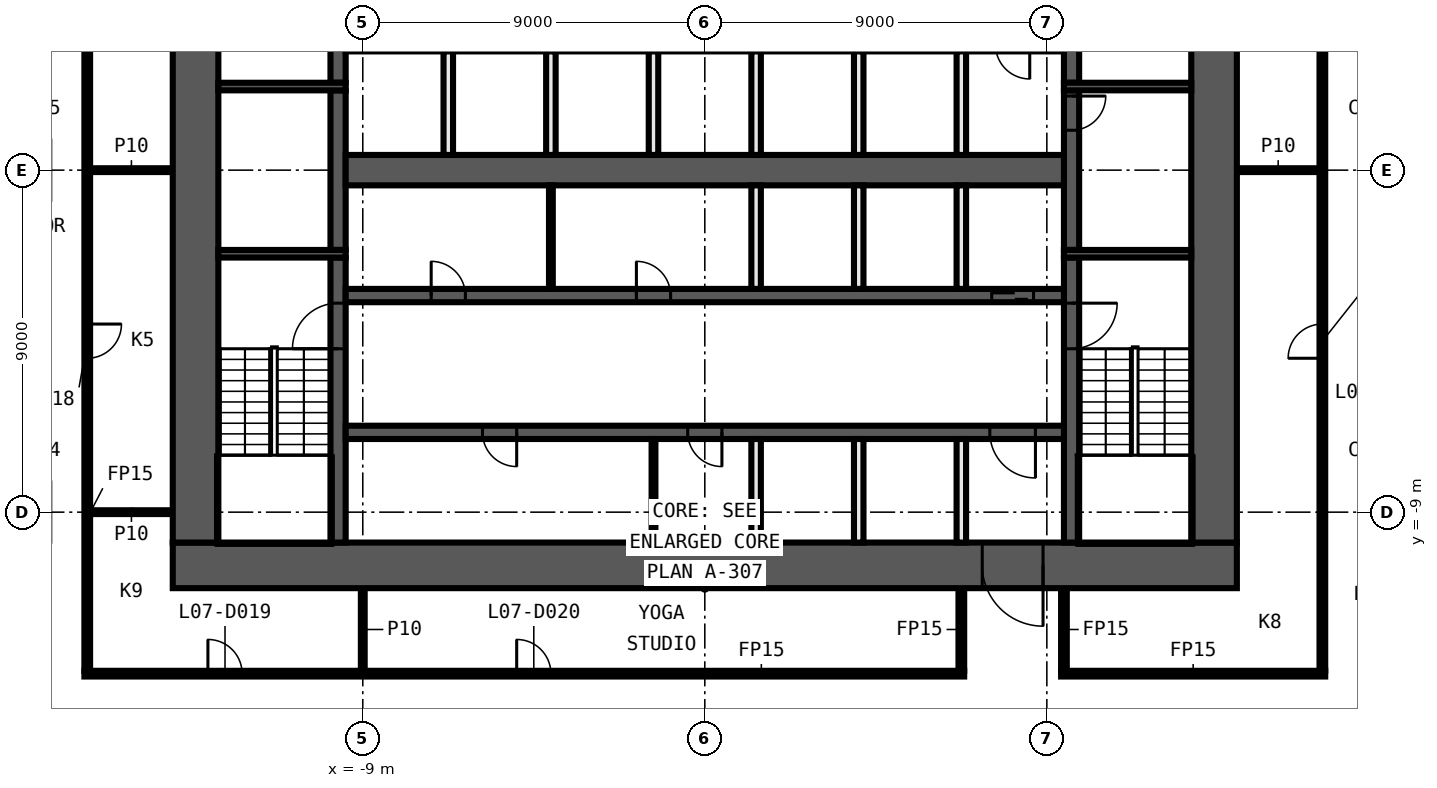
"""IFC4 building model, lengths in metres.
Left out: names, types, materials, properties, quantities, classifications, styles, units other than length and angle.
Written with IfcOpenShell. Run it as: python <this file> out.ifc"""

import sys

from ifc_helpers import new_model, si_unit, direction, frame, frame_2d, origin, place, context, subcontext, project, spatial, rectangle, extrude, element, fill, save


model = new_model("IFC4")
c1 = context("Model", 3, precision=1e-05, world=origin(), true_north=direction((0.0, 1.0)))
c2 = subcontext(c1, "Body", "Model", "MODEL_VIEW")
j1 = project(units=[si_unit("LENGTHUNIT", "METRE"), si_unit("PLANEANGLEUNIT", "RADIAN")], contexts=[c1])
p1 = place(None, origin())
s1 = spatial("IfcSite", under=j1, at=p1, CompositionType="ELEMENT")
p2 = place(p1, origin())
s2 = spatial("IfcBuilding", under=s1, at=p2, CompositionType="ELEMENT")
p3 = place(p2, frame((0.0, 0.0, 47.7)))
s3 = spatial("IfcBuildingStorey", under=s2, at=p3, CompositionType="ELEMENT", Elevation=47.7)
p4 = place(p3, frame((-16.325, -13.25, 0.0), z_axis=(0.0, 0.0, 1.0), x_axis=(1.0, 0.0, 0.0)))
e1 = element("IfcWall", 1, at=p4, inside=s3, PredefinedType="PARTITIONING", context=c2, shape_type="SweptSolid", body=[
    extrude(rectangle(XDim=23.15, YDim=0.15, at=frame_2d((11.575, 0.0))), origin(), (0.0, 0.0, 1.0), 3.3),
])
p5 = place(p4, frame((3.25, 0.0, 0.0)))
e2 = element("IfcOpeningElement", 2, at=p5, cuts=e1, PredefinedType="OPENING", context=c2, shape_type="SweptSolid", body=[
    extrude(rectangle(XDim=0.9, YDim=2.1, at=frame_2d((0.45, 1.05))), frame((0.0, 0.085, 0.0), z_axis=(0.0, -1.0, 0.0), x_axis=(1.0, 0.0, 0.0)), (0.0, 0.0, 1.0), 0.17),
])
p6 = place(p4, frame((11.375, 0.0, 0.0)))
e3 = element("IfcOpeningElement", 3, at=p6, cuts=e1, PredefinedType="OPENING", context=c2, shape_type="SweptSolid", body=[
    extrude(rectangle(XDim=0.9, YDim=2.1, at=frame_2d((0.45, 1.05))), frame((0.0, 0.085, 0.0), z_axis=(0.0, -1.0, 0.0), x_axis=(1.0, 0.0, 0.0)), (0.0, 0.0, 1.0), 0.17),
])
p7 = place(p3, frame((9.375, -13.25, 0.0), z_axis=(0.0, 0.0, 1.0), x_axis=(1.0, 0.0, 0.0)))
e4 = element("IfcWall", 4, at=p7, inside=s3, PredefinedType="PARTITIONING", context=c2, shape_type="SweptSolid", body=[
    extrude(rectangle(XDim=6.95, YDim=0.15, at=frame_2d((3.475, 0.0))), origin(), (0.0, 0.0, 1.0), 3.3),
])
for number, where, z_axis, x_axis in (
    (5, (-16.175, -9.0, 0.0), (0.0, 0.0, 1.0), (1.0, 0.0, 0.0)),
    (6, (-16.175, 0.0, 0.0), (0.0, 0.0, 1.0), (1.0, 0.0, 0.0)),
    (7, (14.0, 0.0, 0.0), (0.0, 0.0, 1.0), (1.0, 0.0, 0.0)),
):
    element("IfcWall", number, at=place(p3, frame(where, z_axis=z_axis, x_axis=x_axis)), inside=s3, PredefinedType="PARTITIONING", context=c2, shape_type="SweptSolid", body=[
        extrude(rectangle(XDim=2.175, YDim=0.1, at=frame_2d((1.087, 0.0))), origin(), (0.0, 0.0, 1.0), 3.3),
    ])
p8 = place(p3, frame((16.25, -13.175, 0.0), z_axis=(0.0, 0.0, 1.0), x_axis=(0.0, 1.0, 0.0)))
e8 = element("IfcWall", 8, at=p8, inside=s3, PredefinedType="PARTITIONING", context=c2, shape_type="SweptSolid", body=[
    extrude(rectangle(XDim=26.35, YDim=0.15, at=frame_2d((13.175, 0.0))), origin(), (0.0, 0.0, 1.0), 3.3),
])
p9 = place(p8, frame((8.225, 0.0, 0.0)))
e9 = element("IfcOpeningElement", 9, at=p9, cuts=e8, PredefinedType="OPENING", context=c2, shape_type="SweptSolid", body=[
    extrude(rectangle(XDim=0.9, YDim=2.1, at=frame_2d((0.45, 1.05))), frame((0.0, 0.085, 0.0), z_axis=(0.0, -1.0, 0.0), x_axis=(1.0, 0.0, 0.0)), (0.0, 0.0, 1.0), 0.17),
])
p10 = place(p8, frame((17.225, 0.0, 0.0)))
e10 = element("IfcOpeningElement", 10, at=p10, cuts=e8, PredefinedType="OPENING", context=c2, shape_type="SweptSolid", body=[
    extrude(rectangle(XDim=0.9, YDim=2.1, at=frame_2d((0.45, 1.05))), frame((0.0, 0.085, 0.0), z_axis=(0.0, -1.0, 0.0), x_axis=(1.0, 0.0, 0.0)), (0.0, 0.0, 1.0), 0.17),
])
for number, where, z_axis, x_axis in (
    (11, (9.45, -13.175, 0.0), (0.0, 0.0, 1.0), (0.0, 1.0, 0.0)),
    (12, (6.75, -13.175, 0.0), (0.0, 0.0, 1.0), (0.0, 1.0, 0.0)),
):
    element("IfcWall", number, at=place(p3, frame(where, z_axis=z_axis, x_axis=x_axis)), inside=s3, PredefinedType="PARTITIONING", context=c2, shape_type="SweptSolid", body=[
        extrude(rectangle(XDim=2.175, YDim=0.15, at=frame_2d((1.087, 0.0))), origin(), (0.0, 0.0, 1.0), 3.3),
    ])
p11 = place(p3, frame((-9.0, -13.175, 0.0), z_axis=(0.0, 0.0, 1.0), x_axis=(0.0, 1.0, 0.0)))
e13 = element("IfcWall", 13, at=p11, inside=s3, PredefinedType="PARTITIONING", context=c2, shape_type="SweptSolid", body=[
    extrude(rectangle(XDim=2.175, YDim=0.1, at=frame_2d((1.087, 0.0))), origin(), (0.0, 0.0, 1.0), 3.3),
])
p12 = place(p3, frame((-16.25, 13.175, 0.0), z_axis=(0.0, 0.0, 1.0), x_axis=(0.0, -1.0, 0.0)))
e14 = element("IfcWall", 14, at=p12, inside=s3, PredefinedType="PARTITIONING", context=c2, shape_type="SweptSolid", body=[
    extrude(rectangle(XDim=26.35, YDim=0.15, at=frame_2d((13.175, 0.0))), origin(), (0.0, 0.0, 1.0), 3.3),
])
p13 = place(p12, frame((17.225, 0.0, 0.0)))
e15 = element("IfcOpeningElement", 15, at=p13, cuts=e14, PredefinedType="OPENING", context=c2, shape_type="SweptSolid", body=[
    extrude(rectangle(XDim=0.9, YDim=2.1, at=frame_2d((0.45, 1.05))), frame((0.0, 0.085, 0.0), z_axis=(0.0, -1.0, 0.0), x_axis=(1.0, 0.0, 0.0)), (0.0, 0.0, 1.0), 0.17),
])
p14 = place(p12, frame((8.225, 0.0, 0.0)))
e16 = element("IfcOpeningElement", 16, at=p14, cuts=e14, PredefinedType="OPENING", context=c2, shape_type="SweptSolid", body=[
    extrude(rectangle(XDim=0.9, YDim=2.1, at=frame_2d((0.45, 1.05))), frame((0.0, 0.085, 0.0), z_axis=(0.0, -1.0, 0.0), x_axis=(1.0, 0.0, 0.0)), (0.0, 0.0, 1.0), 0.17),
])
p15 = place(p3, frame((14.0, -10.4, 0.0), z_axis=(0.0, 0.0, 1.0), x_axis=(-1.0, 0.0, 0.0)))
e17 = element("IfcWall", 17, at=p15, inside=s3, PredefinedType="SHEAR", context=c2, shape_type="SweptSolid", body=[
    extrude(rectangle(XDim=28.0, YDim=1.2, at=frame_2d((14.0, 0.0))), origin(), (0.0, 0.0, 1.0), 3.3),
])
p16 = place(p15, frame((5.1, 0.0, 0.0)))
e18 = element("IfcOpeningElement", 18, at=p16, cuts=e17, PredefinedType="OPENING", context=c2, shape_type="SweptSolid", body=[
    extrude(rectangle(XDim=1.6, YDim=2.1, at=frame_2d((0.8, 1.05))), frame((0.0, 0.61, 0.0), z_axis=(0.0, -1.0, 0.0), x_axis=(1.0, 0.0, 0.0)), (0.0, 0.0, 1.0), 1.22),
])
for number, where, z_axis, x_axis in (
    (19, (13.4, 9.8, 0.0), (0.0, 0.0, 1.0), (0.0, -1.0, 0.0)),
    (20, (-13.4, -9.8, 0.0), (0.0, 0.0, 1.0), (0.0, 1.0, 0.0)),
):
    element("IfcWall", number, at=place(p3, frame(where, z_axis=z_axis, x_axis=x_axis)), inside=s3, PredefinedType="SHEAR", context=c2, shape_type="SweptSolid", body=[
        extrude(rectangle(XDim=19.6, YDim=1.2, at=frame_2d((9.8, 0.0))), origin(), (0.0, 0.0, 1.0), 3.3),
    ])
p17 = place(p3, frame((9.65, -2.3, 0.0), z_axis=(0.0, 0.0, 1.0), x_axis=(0.0, -1.0, 0.0)))
e21 = element("IfcWall", 21, at=p17, inside=s3, PredefinedType="SHEAR", context=c2, shape_type="SweptSolid", body=[
    extrude(rectangle(XDim=7.5, YDim=0.4, at=frame_2d((3.75, 0.0))), origin(), (0.0, 0.0, 1.0), 3.3),
])
p18 = place(p17, frame((1.2, 0.0, 0.0)))
e22 = element("IfcOpeningElement", 22, at=p18, cuts=e21, PredefinedType="OPENING", context=c2, shape_type="SweptSolid", body=[
    extrude(rectangle(XDim=1.2, YDim=2.1, at=frame_2d((0.6, 1.05))), frame((0.0, 0.21, 0.0), z_axis=(0.0, -1.0, 0.0), x_axis=(1.0, 0.0, 0.0)), (0.0, 0.0, 1.0), 0.42),
])
p19 = place(p3, frame((9.65, 2.1, 0.0), z_axis=(0.0, 0.0, 1.0), x_axis=(0.0, -1.0, 0.0)))
e23 = element("IfcWall", 23, at=p19, inside=s3, PredefinedType="SHEAR", context=c2, shape_type="SweptSolid", body=[
    extrude(rectangle(XDim=4.2, YDim=0.4, at=frame_2d((2.1, 0.0))), origin(), (0.0, 0.0, 1.0), 3.3),
])
p20 = place(p19, frame((0.15, 0.0, 0.0)))
e24 = element("IfcOpeningElement", 24, at=p20, cuts=e23, PredefinedType="OPENING", context=c2, shape_type="SweptSolid", body=[
    extrude(rectangle(XDim=0.9, YDim=2.1, at=frame_2d((0.45, 1.05))), frame((0.0, 0.21, 0.0), z_axis=(0.0, -1.0, 0.0), x_axis=(1.0, 0.0, 0.0)), (0.0, 0.0, 1.0), 0.42),
])
p21 = place(p3, frame((9.65, 9.8, 0.0), z_axis=(0.0, 0.0, 1.0), x_axis=(0.0, -1.0, 0.0)))
e25 = element("IfcWall", 25, at=p21, inside=s3, PredefinedType="SHEAR", context=c2, shape_type="SweptSolid", body=[
    extrude(rectangle(XDim=7.5, YDim=0.4, at=frame_2d((3.75, 0.0))), origin(), (0.0, 0.0, 1.0), 3.3),
])
p22 = place(p21, frame((5.1, 0.0, 0.0)))
e26 = element("IfcOpeningElement", 26, at=p22, cuts=e25, PredefinedType="OPENING", context=c2, shape_type="SweptSolid", body=[
    extrude(rectangle(XDim=1.2, YDim=2.1, at=frame_2d((0.6, 1.05))), frame((0.0, 0.21, 0.0), z_axis=(0.0, -1.0, 0.0), x_axis=(1.0, 0.0, 0.0)), (0.0, 0.0, 1.0), 0.42),
])
p23 = place(p3, frame((-9.65, -9.8, 0.0), z_axis=(0.0, 0.0, 1.0), x_axis=(0.0, 1.0, 0.0)))
e27 = element("IfcWall", 27, at=p23, inside=s3, PredefinedType="SHEAR", context=c2, shape_type="SweptSolid", body=[
    extrude(rectangle(XDim=7.5, YDim=0.4, at=frame_2d((3.75, 0.0))), origin(), (0.0, 0.0, 1.0), 3.3),
])
p24 = place(p23, frame((5.1, 0.0, 0.0)))
e28 = element("IfcOpeningElement", 28, at=p24, cuts=e27, PredefinedType="OPENING", context=c2, shape_type="SweptSolid", body=[
    extrude(rectangle(XDim=1.2, YDim=2.1, at=frame_2d((0.6, 1.05))), frame((0.0, 0.21, 0.0), z_axis=(0.0, -1.0, 0.0), x_axis=(1.0, 0.0, 0.0)), (0.0, 0.0, 1.0), 0.42),
])
p25 = place(p3, frame((-9.65, -2.1, 0.0), z_axis=(0.0, 0.0, 1.0), x_axis=(0.0, 1.0, 0.0)))
e29 = element("IfcWall", 29, at=p25, inside=s3, PredefinedType="SHEAR", context=c2, shape_type="SweptSolid", body=[
    extrude(rectangle(XDim=4.2, YDim=0.4, at=frame_2d((2.1, 0.0))), origin(), (0.0, 0.0, 1.0), 3.3),
])
p26 = place(p3, frame((-9.65, 2.3, 0.0), z_axis=(0.0, 0.0, 1.0), x_axis=(0.0, 1.0, 0.0)))
e30 = element("IfcWall", 30, at=p26, inside=s3, PredefinedType="SHEAR", context=c2, shape_type="SweptSolid", body=[
    extrude(rectangle(XDim=7.5, YDim=0.4, at=frame_2d((3.75, 0.0))), origin(), (0.0, 0.0, 1.0), 3.3),
])
p27 = place(p26, frame((1.2, 0.0, 0.0)))
e31 = element("IfcOpeningElement", 31, at=p27, cuts=e30, PredefinedType="OPENING", context=c2, shape_type="SweptSolid", body=[
    extrude(rectangle(XDim=1.2, YDim=2.1, at=frame_2d((0.6, 1.05))), frame((0.0, 0.21, 0.0), z_axis=(0.0, -1.0, 0.0), x_axis=(1.0, 0.0, 0.0)), (0.0, 0.0, 1.0), 0.42),
])
for number, where, z_axis, x_axis in (
    (32, (9.45, 2.2, 0.0), (0.0, 0.0, 1.0), (1.0, 0.0, 0.0)),
    (33, (-9.45, 2.2, 0.0), (0.0, 0.0, 1.0), (-1.0, 0.0, 0.0)),
    (34, (9.45, -2.2, 0.0), (0.0, 0.0, 1.0), (1.0, 0.0, 0.0)),
    (35, (-9.45, -2.2, 0.0), (0.0, 0.0, 1.0), (-1.0, 0.0, 0.0)),
):
    element("IfcWall", number, at=place(p3, frame(where, z_axis=z_axis, x_axis=x_axis)), inside=s3, PredefinedType="SHEAR", context=c2, shape_type="SweptSolid", body=[
        extrude(rectangle(XDim=3.35, YDim=0.2, at=frame_2d((1.675, 0.0))), origin(), (0.0, 0.0, 1.0), 3.3),
    ])
p28 = place(p3, frame((-9.45, -3.3, 0.0), z_axis=(0.0, 0.0, 1.0), x_axis=(1.0, 0.0, 0.0)))
e36 = element("IfcWall", 36, at=p28, inside=s3, PredefinedType="SHEAR", context=c2, shape_type="SweptSolid", body=[
    extrude(rectangle(XDim=18.9, YDim=0.35, at=frame_2d((9.45, 0.0))), origin(), (0.0, 0.0, 1.0), 3.3),
])
p29 = place(p28, frame((17.0, 0.0, 0.0)))
e37 = element("IfcOpeningElement", 37, at=p29, cuts=e36, PredefinedType="OPENING", context=c2, shape_type="SweptSolid", body=[
    extrude(rectangle(XDim=1.1, YDim=2.1, at=frame_2d((0.55, 1.05))), frame((0.0, 0.185, 0.0), z_axis=(0.0, -1.0, 0.0), x_axis=(1.0, 0.0, 0.0)), (0.0, 0.0, 1.0), 0.37),
])
p30 = place(p28, frame((2.25, 0.0, 0.0)))
e38 = element("IfcOpeningElement", 38, at=p30, cuts=e36, PredefinedType="OPENING", context=c2, shape_type="SweptSolid", body=[
    extrude(rectangle(XDim=0.9, YDim=2.1, at=frame_2d((0.45, 1.05))), frame((0.0, 0.185, 0.0), z_axis=(0.0, -1.0, 0.0), x_axis=(1.0, 0.0, 0.0)), (0.0, 0.0, 1.0), 0.37),
])
p31 = place(p28, frame((7.65, 0.0, 0.0)))
e39 = element("IfcOpeningElement", 39, at=p31, cuts=e36, PredefinedType="OPENING", context=c2, shape_type="SweptSolid", body=[
    extrude(rectangle(XDim=0.9, YDim=2.1, at=frame_2d((0.45, 1.05))), frame((0.0, 0.185, 0.0), z_axis=(0.0, -1.0, 0.0), x_axis=(1.0, 0.0, 0.0)), (0.0, 0.0, 1.0), 0.37),
])
p32 = place(p3, frame((9.45, -6.9, 0.0), z_axis=(0.0, 0.0, 1.0), x_axis=(-1.0, 0.0, 0.0)))
e40 = element("IfcWall", 40, at=p32, inside=s3, PredefinedType="SHEAR", context=c2, shape_type="SweptSolid", body=[
    extrude(rectangle(XDim=18.9, YDim=0.35, at=frame_2d((9.45, 0.0))), origin(), (0.0, 0.0, 1.0), 3.3),
])
p33 = place(p32, frame((0.75, 0.0, 0.0)))
e41 = element("IfcOpeningElement", 41, at=p33, cuts=e40, PredefinedType="OPENING", context=c2, shape_type="SweptSolid", body=[
    extrude(rectangle(XDim=1.2, YDim=2.1, at=frame_2d((0.6, 1.05))), frame((0.0, 0.185, 0.0), z_axis=(0.0, -1.0, 0.0), x_axis=(1.0, 0.0, 0.0)), (0.0, 0.0, 1.0), 0.37),
])
p34 = place(p32, frame((14.4, 0.0, 0.0)))
e42 = element("IfcOpeningElement", 42, at=p34, cuts=e40, PredefinedType="OPENING", context=c2, shape_type="SweptSolid", body=[
    extrude(rectangle(XDim=0.9, YDim=2.1, at=frame_2d((0.45, 1.05))), frame((0.0, 0.185, 0.0), z_axis=(0.0, -1.0, 0.0), x_axis=(1.0, 0.0, 0.0)), (0.0, 0.0, 1.0), 0.37),
])
p35 = place(p32, frame((9.0, 0.0, 0.0)))
e43 = element("IfcOpeningElement", 43, at=p35, cuts=e40, PredefinedType="OPENING", context=c2, shape_type="SweptSolid", body=[
    extrude(rectangle(XDim=0.9, YDim=2.1, at=frame_2d((0.45, 1.05))), frame((0.0, 0.185, 0.0), z_axis=(0.0, -1.0, 0.0), x_axis=(1.0, 0.0, 0.0)), (0.0, 0.0, 1.0), 0.37),
])
p36 = place(p3, frame((-9.45, 0.0, 0.0), z_axis=(0.0, 0.0, 1.0), x_axis=(1.0, 0.0, 0.0)))
e44 = element("IfcWall", 44, at=p36, inside=s3, PredefinedType="SHEAR", context=c2, shape_type="SweptSolid", body=[
    extrude(rectangle(XDim=18.9, YDim=0.8, at=frame_2d((9.45, 0.0))), origin(), (0.0, 0.0, 1.0), 3.3),
])
for number, where, z_axis, x_axis in (
    (45, (6.75, -9.8, 0.0), (0.0, 0.0, 1.0), (0.0, 1.0, 0.0)),
    (46, (6.75, -3.125, 0.0), (0.0, 0.0, 1.0), (0.0, 1.0, 0.0)),
    (47, (6.75, 0.4, 0.0), (0.0, 0.0, 1.0), (0.0, 1.0, 0.0)),
    (48, (4.05, -9.8, 0.0), (0.0, 0.0, 1.0), (0.0, 1.0, 0.0)),
    (49, (4.05, -3.125, 0.0), (0.0, 0.0, 1.0), (0.0, 1.0, 0.0)),
    (50, (4.05, 0.4, 0.0), (0.0, 0.0, 1.0), (0.0, 1.0, 0.0)),
    (51, (1.35, -9.8, 0.0), (0.0, 0.0, 1.0), (0.0, 1.0, 0.0)),
    (52, (1.35, -3.125, 0.0), (0.0, 0.0, 1.0), (0.0, 1.0, 0.0)),
    (53, (1.35, 0.4, 0.0), (0.0, 0.0, 1.0), (0.0, 1.0, 0.0)),
):
    element("IfcWall", number, at=place(p3, frame(where, z_axis=z_axis, x_axis=x_axis)), inside=s3, PredefinedType="SOLIDWALL", context=c2, shape_type="SweptSolid", body=[
        extrude(rectangle(XDim=2.725, YDim=0.25, at=frame_2d((1.363, 0.0))), origin(), (0.0, 0.0, 1.0), 3.3),
    ])
p37 = place(p3, frame((-1.35, -9.8, 0.0), z_axis=(0.0, 0.0, 1.0), x_axis=(0.0, 1.0, 0.0)))
e54 = element("IfcWall", 54, at=p37, inside=s3, PredefinedType="PARTITIONING", context=c2, shape_type="SweptSolid", body=[
    extrude(rectangle(XDim=2.725, YDim=0.1, at=frame_2d((1.363, 0.0))), origin(), (0.0, 0.0, 1.0), 3.3),
])
p38 = place(p3, frame((-1.35, 0.4, 0.0), z_axis=(0.0, 0.0, 1.0), x_axis=(0.0, 1.0, 0.0)))
e55 = element("IfcWall", 55, at=p38, inside=s3, PredefinedType="SOLIDWALL", context=c2, shape_type="SweptSolid", body=[
    extrude(rectangle(XDim=2.725, YDim=0.25, at=frame_2d((1.363, 0.0))), origin(), (0.0, 0.0, 1.0), 3.3),
])
p39 = place(p3, frame((-4.05, -3.125, 0.0), z_axis=(0.0, 0.0, 1.0), x_axis=(0.0, 1.0, 0.0)))
e56 = element("IfcWall", 56, at=p39, inside=s3, PredefinedType="PARTITIONING", context=c2, shape_type="SweptSolid", body=[
    extrude(rectangle(XDim=2.725, YDim=0.1, at=frame_2d((1.363, 0.0))), origin(), (0.0, 0.0, 1.0), 3.3),
])
for number, where, z_axis, x_axis in (
    (57, (-4.05, 0.4, 0.0), (0.0, 0.0, 1.0), (0.0, 1.0, 0.0)),
    (58, (-6.75, 0.4, 0.0), (0.0, 0.0, 1.0), (0.0, 1.0, 0.0)),
):
    element("IfcWall", number, at=place(p3, frame(where, z_axis=z_axis, x_axis=x_axis)), inside=s3, PredefinedType="SOLIDWALL", context=c2, shape_type="SweptSolid", body=[
        extrude(rectangle(XDim=2.725, YDim=0.25, at=frame_2d((1.363, 0.0))), origin(), (0.0, 0.0, 1.0), 3.3),
    ])
p40 = place(p13, origin())
e59 = element("IfcDoor", 59, at=p40, inside=s3, OperationType="SINGLE_SWING_RIGHT", PredefinedType="DOOR", context=c2, shape_type="SweptSolid", body=[
    extrude(rectangle(XDim=0.9, YDim=2.1, at=frame_2d((0.45, 1.05))), frame((0.0, 0.025, 0.0), z_axis=(0.0, -1.0, 0.0), x_axis=(1.0, 0.0, 0.0)), (0.0, 0.0, 1.0), 0.05),
])
fill(e15, e59)
p41 = place(p5, origin())
e60 = element("IfcDoor", 60, at=p41, inside=s3, OperationType="SINGLE_SWING_LEFT", PredefinedType="DOOR", context=c2, shape_type="SweptSolid", body=[
    extrude(rectangle(XDim=0.9, YDim=2.1, at=frame_2d((0.45, 1.05))), frame((0.0, 0.025, 0.0), z_axis=(0.0, -1.0, 0.0), x_axis=(1.0, 0.0, 0.0)), (0.0, 0.0, 1.0), 0.05),
])
fill(e2, e60)
p42 = place(p6, origin())
e61 = element("IfcDoor", 61, at=p42, inside=s3, OperationType="SINGLE_SWING_RIGHT", PredefinedType="DOOR", context=c2, shape_type="SweptSolid", body=[
    extrude(rectangle(XDim=0.9, YDim=2.1, at=frame_2d((0.45, 1.05))), frame((0.0, 0.025, 0.0), z_axis=(0.0, -1.0, 0.0), x_axis=(1.0, 0.0, 0.0)), (0.0, 0.0, 1.0), 0.05),
])
fill(e3, e61)
p43 = place(p9, origin())
e62 = element("IfcDoor", 62, at=p43, inside=s3, OperationType="SINGLE_SWING_LEFT", PredefinedType="DOOR", context=c2, shape_type="SweptSolid", body=[
    extrude(rectangle(XDim=0.9, YDim=2.1, at=frame_2d((0.45, 1.05))), frame((0.0, 0.025, 0.0), z_axis=(0.0, -1.0, 0.0), x_axis=(1.0, 0.0, 0.0)), (0.0, 0.0, 1.0), 0.05),
])
fill(e9, e62)
p44 = place(p20, origin())
e63 = element("IfcDoor", 63, at=p44, inside=s3, OperationType="SINGLE_SWING_RIGHT", PredefinedType="DOOR", context=c2, shape_type="SweptSolid", body=[
    extrude(rectangle(XDim=0.9, YDim=2.1, at=frame_2d((0.45, 1.05))), frame((0.0, 0.025, 0.0), z_axis=(0.0, -1.0, 0.0), x_axis=(1.0, 0.0, 0.0)), (0.0, 0.0, 1.0), 0.05),
])
fill(e24, e63)
p45 = place(p29, origin())
e64 = element("IfcDoor", 64, at=p45, inside=s3, OperationType="DOUBLE_DOOR_SLIDING", PredefinedType="DOOR", context=c2, shape_type="SweptSolid", body=[
    extrude(rectangle(XDim=1.1, YDim=2.1, at=frame_2d((0.55, 1.05))), frame((0.0, 0.025, 0.0), z_axis=(0.0, -1.0, 0.0), x_axis=(1.0, 0.0, 0.0)), (0.0, 0.0, 1.0), 0.05),
])
fill(e37, e64)
p46 = place(p16, origin())
e65 = element("IfcDoor", 65, at=p46, inside=s3, OperationType="DOUBLE_DOOR_SINGLE_SWING", PredefinedType="DOOR", context=c2, shape_type="SweptSolid", body=[
    extrude(rectangle(XDim=1.6, YDim=2.1, at=frame_2d((0.8, 1.05))), frame((0.0, 0.025, 0.0), z_axis=(0.0, -1.0, 0.0), x_axis=(1.0, 0.0, 0.0)), (0.0, 0.0, 1.0), 0.05),
])
fill(e18, e65)
p47 = place(p33, origin())
e66 = element("IfcDoor", 66, at=p47, inside=s3, OperationType="SINGLE_SWING_LEFT", PredefinedType="DOOR", context=c2, shape_type="SweptSolid", body=[
    extrude(rectangle(XDim=1.2, YDim=2.1, at=frame_2d((0.6, 1.05))), frame((0.0, 0.025, 0.0), z_axis=(0.0, -1.0, 0.0), x_axis=(1.0, 0.0, 0.0)), (0.0, 0.0, 1.0), 0.05),
])
fill(e41, e66)
p48 = place(p30, origin())
e67 = element("IfcDoor", 67, at=p48, inside=s3, OperationType="SINGLE_SWING_RIGHT", PredefinedType="DOOR", context=c2, shape_type="SweptSolid", body=[
    extrude(rectangle(XDim=0.9, YDim=2.1, at=frame_2d((0.45, 1.05))), frame((0.0, 0.025, 0.0), z_axis=(0.0, -1.0, 0.0), x_axis=(1.0, 0.0, 0.0)), (0.0, 0.0, 1.0), 0.05),
])
fill(e38, e67)
p49 = place(p31, origin())
e68 = element("IfcDoor", 68, at=p49, inside=s3, OperationType="SINGLE_SWING_LEFT", PredefinedType="DOOR", context=c2, shape_type="SweptSolid", body=[
    extrude(rectangle(XDim=0.9, YDim=2.1, at=frame_2d((0.45, 1.05))), frame((0.0, 0.025, 0.0), z_axis=(0.0, -1.0, 0.0), x_axis=(1.0, 0.0, 0.0)), (0.0, 0.0, 1.0), 0.05),
])
fill(e39, e68)
p50 = place(p34, origin())
e69 = element("IfcDoor", 69, at=p50, inside=s3, OperationType="SINGLE_SWING_RIGHT", PredefinedType="DOOR", context=c2, shape_type="SweptSolid", body=[
    extrude(rectangle(XDim=0.9, YDim=2.1, at=frame_2d((0.45, 1.05))), frame((0.0, 0.025, 0.0), z_axis=(0.0, -1.0, 0.0), x_axis=(1.0, 0.0, 0.0)), (0.0, 0.0, 1.0), 0.05),
])
fill(e42, e69)
p51 = place(p35, origin())
e70 = element("IfcDoor", 70, at=p51, inside=s3, OperationType="SINGLE_SWING_LEFT", PredefinedType="DOOR", context=c2, shape_type="SweptSolid", body=[
    extrude(rectangle(XDim=0.9, YDim=2.1, at=frame_2d((0.45, 1.05))), frame((0.0, 0.025, 0.0), z_axis=(0.0, -1.0, 0.0), x_axis=(1.0, 0.0, 0.0)), (0.0, 0.0, 1.0), 0.05),
])
fill(e43, e70)
p52 = place(p18, origin())
e71 = element("IfcDoor", 71, at=p52, inside=s3, OperationType="SINGLE_SWING_RIGHT", PredefinedType="DOOR", context=c2, shape_type="SweptSolid", body=[
    extrude(rectangle(XDim=1.2, YDim=2.1, at=frame_2d((0.6, 1.05))), frame((0.0, 0.025, 0.0), z_axis=(0.0, -1.0, 0.0), x_axis=(1.0, 0.0, 0.0)), (0.0, 0.0, 1.0), 0.05),
])
fill(e22, e71)
p53 = place(p24, origin())
e72 = element("IfcDoor", 72, at=p53, inside=s3, OperationType="SINGLE_SWING_LEFT", PredefinedType="DOOR", context=c2, shape_type="SweptSolid", body=[
    extrude(rectangle(XDim=1.2, YDim=2.1, at=frame_2d((0.6, 1.05))), frame((0.0, 0.025, 0.0), z_axis=(0.0, -1.0, 0.0), x_axis=(1.0, 0.0, 0.0)), (0.0, 0.0, 1.0), 0.05),
])
fill(e28, e72)
save(model, sys.argv[1])
